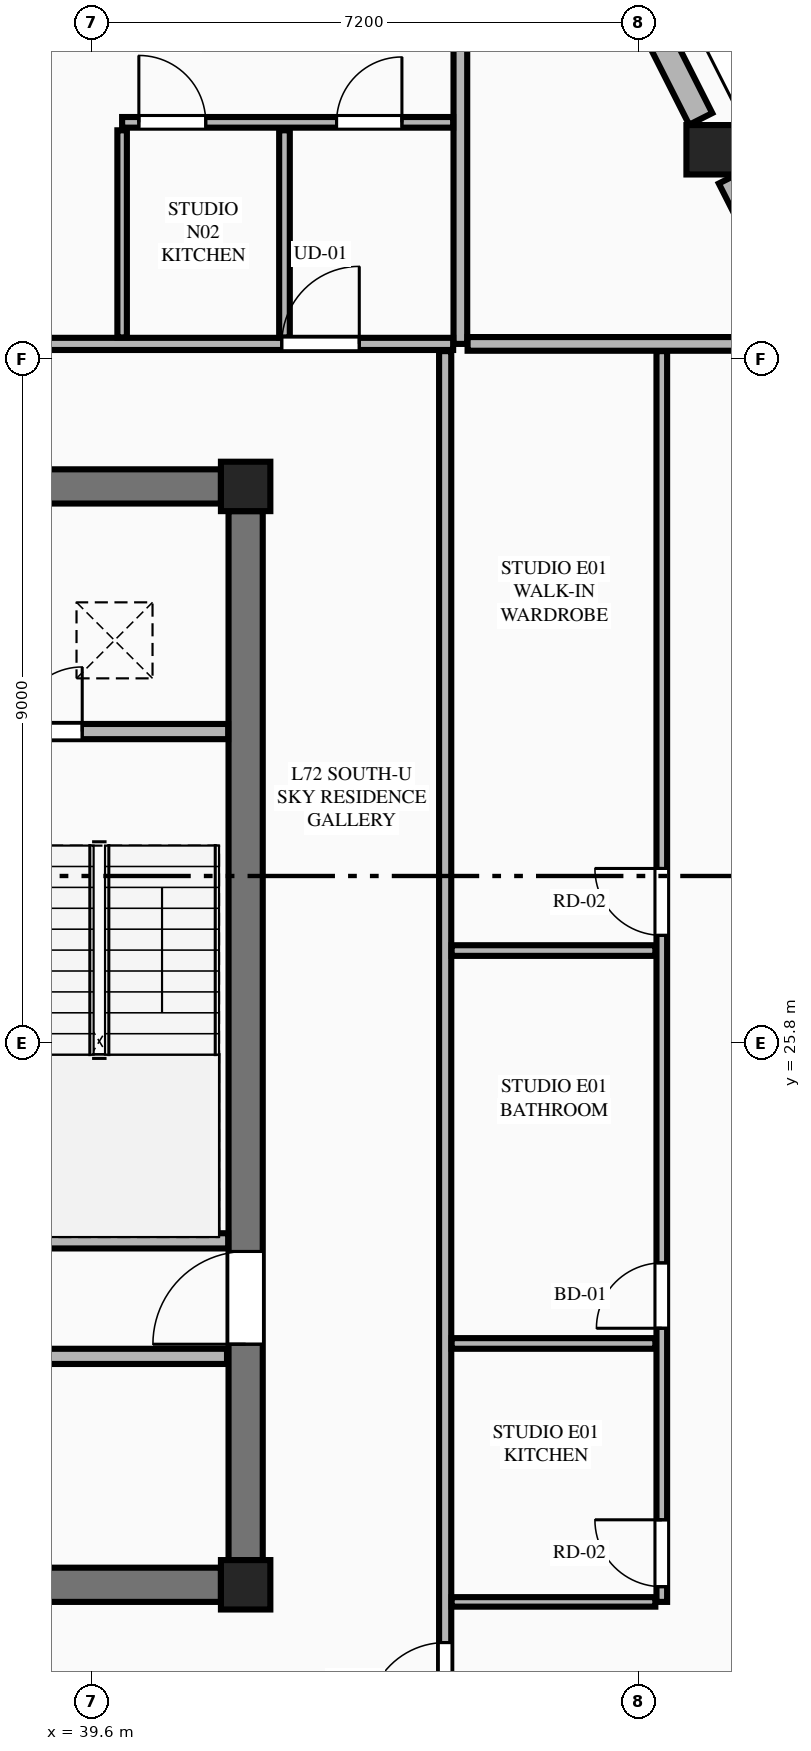
"""IFC4 building model, lengths in metres.
Left out: names, types, materials, properties, quantities, classifications, styles, units other than length and angle.
Written with IfcOpenShell. Run it as: python <this file> out.ifc"""

import sys

from ifc_helpers import new_model, si_unit, direction, frame, frame_2d, origin, origin_2d, place, context, subcontext, project, spatial, rectangle, extrude, element, fill, save


model = new_model("IFC4")
c1 = context("Model", 3, precision=1e-05, world=origin(), true_north=direction((0.0, 1.0)))
c2 = subcontext(c1, "Body", "Model", "MODEL_VIEW")
j1 = project(units=[si_unit("LENGTHUNIT", "METRE"), si_unit("PLANEANGLEUNIT", "RADIAN")], contexts=[c1])
p1 = place(None, origin())
s1 = spatial("IfcSite", under=j1, at=p1, CompositionType="ELEMENT")
p2 = place(p1, origin())
s2 = spatial("IfcBuilding", under=s1, at=p2, CompositionType="ELEMENT")
p3 = place(p2, frame((0.0, 0.0, 270.8)))
s3 = spatial("IfcBuildingStorey", under=s2, at=p3, CompositionType="ELEMENT", Elevation=270.8)
for number, where, z_axis, x_axis in (
    (1, (41.625, 18.675, 0.0), (0.0, 0.0, 1.0), (1.0, 0.0, 0.0)),
    (2, (41.625, 33.125, 0.0), (0.0, 0.0, 1.0), (1.0, 0.0, 0.0)),
):
    element("IfcColumn", number, at=place(p3, frame(where, z_axis=z_axis, x_axis=x_axis)), inside=s3, PredefinedType="COLUMN", context=c2, shape_type="SweptSolid", body=[
        extrude(rectangle(XDim=0.65, YDim=0.65, at=origin_2d()), origin(), (0.0, 0.0, 1.0), 3.65),
    ])
for number, where, z_axis, x_axis in (
    (3, (23.5, 18.675, 0.0), (0.0, 0.0, 1.0), (1.0, 0.0, 0.0)),
    (4, (23.5, 33.125, 0.0), (0.0, 0.0, 1.0), (1.0, 0.0, 0.0)),
):
    element("IfcWall", number, at=place(p3, frame(where, z_axis=z_axis, x_axis=x_axis)), inside=s3, PredefinedType="SHEAR", context=c2, shape_type="SweptSolid", body=[
        extrude(rectangle(XDim=17.8, YDim=0.45, at=frame_2d((8.9, 0.0))), origin(), (0.0, 0.0, 1.0), 3.45),
    ])
p4 = place(p3, frame((41.625, 19.0, 0.0), z_axis=(0.0, 0.0, 1.0), x_axis=(0.0, 1.0, 0.0)))
e5 = element("IfcWall", 5, at=p4, inside=s3, PredefinedType="SHEAR", context=c2, shape_type="SweptSolid", body=[
    extrude(rectangle(XDim=13.8, YDim=0.45, at=frame_2d((6.9, 0.0))), origin(), (0.0, 0.0, 1.0), 3.45),
])
p5 = place(p4, frame((2.84, 0.0, 0.0)))
e6 = element("IfcOpeningElement", 6, at=p5, cuts=e5, PredefinedType="OPENING", context=c2, shape_type="SweptSolid", body=[
    extrude(rectangle(XDim=1.22, YDim=2.25, at=frame_2d((0.61, 1.125))), frame((0.0, 0.235, 0.0), z_axis=(0.0, -1.0, 0.0), x_axis=(1.0, 0.0, 0.0)), (0.0, 0.0, 1.0), 0.47),
])
p6 = place(p3, frame((47.749, 37.554, 0.0), z_axis=(0.0, 0.0, 1.0), x_axis=(1.0, 0.0, 0.0)))
e7 = element("IfcColumn", 7, at=p6, inside=s3, PredefinedType="COLUMN", context=c2, shape_type="SweptSolid", body=[
    extrude(rectangle(XDim=0.65, YDim=0.65, at=origin_2d()), origin(), (0.0, 0.0, 1.0), 3.65),
])
p7 = place(p3, frame((38.125, 23.2, 0.0), z_axis=(0.0, 0.0, 1.0), x_axis=(1.0, 0.0, 0.0)))
e8 = element("IfcWall", 8, at=p7, inside=s3, PredefinedType="PLUMBINGWALL", context=c2, shape_type="SweptSolid", body=[
    extrude(rectangle(XDim=3.27, YDim=0.2, at=frame_2d((1.635, 0.0))), origin(), (0.0, 0.0, 1.0), 3.45),
])
p8 = place(p3, frame((38.125, 29.9, 0.0), z_axis=(0.0, 0.0, 1.0), x_axis=(1.0, 0.0, 0.0)))
e9 = element("IfcWall", 9, at=p8, inside=s3, PredefinedType="PLUMBINGWALL", context=c2, shape_type="SweptSolid", body=[
    extrude(rectangle(XDim=3.27, YDim=0.2, at=frame_2d((1.635, 0.0))), origin(), (0.0, 0.0, 1.0), 3.45),
])
p9 = place(p8, frame((0.5, 0.0, 0.0)))
e10 = element("IfcOpeningElement", 10, at=p9, cuts=e9, PredefinedType="OPENING", context=c2, shape_type="SweptSolid", body=[
    extrude(rectangle(XDim=0.85, YDim=2.05, at=frame_2d((0.425, 1.025))), frame((0.0, 0.11, 0.0), z_axis=(0.0, -1.0, 0.0), x_axis=(1.0, 0.0, 0.0)), (0.0, 0.0, 1.0), 0.22),
])
p10 = place(p3, frame((23.42, 21.68, 0.0), z_axis=(0.0, 0.0, 1.0), x_axis=(1.0, 0.0, 0.0)))
e11 = element("IfcWall", 11, at=p10, inside=s3, PredefinedType="PLUMBINGWALL", context=c2, shape_type="SweptSolid", body=[
    extrude(rectangle(XDim=17.96, YDim=0.2, at=frame_2d((8.98, 0.0))), origin(), (0.0, 0.0, 1.0), 3.45),
])
p11 = place(p10, frame((0.46, 0.0, 0.0)))
e12 = element("IfcOpeningElement", 12, at=p11, cuts=e11, PredefinedType="OPENING", context=c2, shape_type="SweptSolid", body=[
    extrude(rectangle(XDim=0.92, YDim=2.15, at=frame_2d((0.46, 1.075))), frame((0.0, 0.11, 0.0), z_axis=(0.0, -1.0, 0.0), x_axis=(1.0, 0.0, 0.0)), (0.0, 0.0, 1.0), 0.22),
])
p12 = place(p10, frame((9.48, 0.0, 0.0)))
e13 = element("IfcOpeningElement", 13, at=p12, cuts=e11, PredefinedType="OPENING", context=c2, shape_type="SweptSolid", body=[
    extrude(rectangle(XDim=0.92, YDim=2.15, at=frame_2d((0.46, 1.075))), frame((0.0, 0.11, 0.0), z_axis=(0.0, -1.0, 0.0), x_axis=(1.0, 0.0, 0.0)), (0.0, 0.0, 1.0), 0.22),
])
p13 = place(p3, frame((48.002, 14.413, 0.0), z_axis=(0.0, 0.0, 1.0), x_axis=(0.451468341582, 0.892287137949, 0.0)))
e14 = element("IfcWall", 14, at=p13, inside=s3, PredefinedType="STANDARD", context=c2, shape_type="SweptSolid", body=[
    extrude(rectangle(XDim=4.723, YDim=0.34, at=frame_2d((2.361, 0.0))), origin(), (0.0, 0.0, 1.0), 2.983),
])
p14 = place(p13, frame((2.941, 0.0, 0.0)))
e15 = element("IfcOpeningElement", 15, at=p14, cuts=e14, PredefinedType="OPENING", context=c2, shape_type="SweptSolid", body=[
    extrude(rectangle(XDim=1.1, YDim=2.25, at=frame_2d((0.55, 1.125))), frame((0.0, 0.18, 0.0), z_axis=(0.0, -1.0, 0.0), x_axis=(1.0, 0.0, 0.0)), (0.0, 0.0, 1.0), 0.36),
])
p15 = place(p13, frame((0.434, 0.0, 0.75)))
e16 = element("IfcOpeningElement", 16, at=p15, cuts=e14, PredefinedType="OPENING", context=c2, shape_type="SweptSolid", body=[
    extrude(rectangle(XDim=1.1, YDim=2.0, at=frame_2d((0.55, 1.0))), frame((0.0, 0.18, 0.0), z_axis=(0.0, -1.0, 0.0), x_axis=(1.0, 0.0, 0.0)), (0.0, 0.0, 1.0), 0.36),
])
p16 = place(p3, frame((50.134, 32.973, 0.0), z_axis=(0.0, 0.0, 1.0), x_axis=(-0.451447516904, 0.892297674255, 0.0)))
e17 = element("IfcWall", 17, at=p16, inside=s3, PredefinedType="STANDARD", context=c2, shape_type="SweptSolid", body=[
    extrude(rectangle(XDim=4.723, YDim=0.34, at=frame_2d((2.361, 0.0))), origin(), (0.0, 0.0, 1.0), 2.983),
])
p17 = place(p16, frame((0.34, 0.0, 0.75)))
e18 = element("IfcOpeningElement", 18, at=p17, cuts=e17, PredefinedType="OPENING", context=c2, shape_type="SweptSolid", body=[
    extrude(rectangle(XDim=1.55, YDim=2.05, at=frame_2d((0.775, 1.025))), frame((0.0, 0.18, 0.0), z_axis=(0.0, -1.0, 0.0), x_axis=(1.0, 0.0, 0.0)), (0.0, 0.0, 1.0), 0.36),
])
p18 = place(p16, frame((3.077, 0.0, 0.75)))
e19 = element("IfcOpeningElement", 19, at=p18, cuts=e17, PredefinedType="OPENING", context=c2, shape_type="SweptSolid", body=[
    extrude(rectangle(XDim=1.1, YDim=2.0, at=frame_2d((0.55, 1.0))), frame((0.0, 0.18, 0.0), z_axis=(0.0, -1.0, 0.0), x_axis=(1.0, 0.0, 0.0)), (0.0, 0.0, 1.0), 0.36),
])
p19 = place(p3, frame((47.612, 37.96, 0.0), z_axis=(0.0, 0.0, 1.0), x_axis=(-0.45154039276, 0.892250678737, 0.0)))
e20 = element("IfcWall", 20, at=p19, inside=s3, PredefinedType="STANDARD", context=c2, shape_type="SweptSolid", body=[
    extrude(rectangle(XDim=4.554, YDim=0.34, at=frame_2d((2.277, 0.0))), origin(), (0.0, 0.0, 1.0), 2.983),
])
p20 = place(p19, frame((1.577, 0.0, 0.75)))
e21 = element("IfcOpeningElement", 21, at=p20, cuts=e20, PredefinedType="OPENING", context=c2, shape_type="SweptSolid", body=[
    extrude(rectangle(XDim=1.4, YDim=2.05, at=frame_2d((0.7, 1.025))), frame((0.0, 0.18, 0.0), z_axis=(0.0, -1.0, 0.0), x_axis=(1.0, 0.0, 0.0)), (0.0, 0.0, 1.0), 0.36),
])
p21 = place(p3, frame((44.45, 35.0, 0.0), z_axis=(0.0, 0.0, 1.0), x_axis=(0.0, 1.0, 0.0)))
e22 = element("IfcWall", 22, at=p21, inside=s3, PredefinedType="PARTITIONING", context=c2, shape_type="SweptSolid", body=[
    extrude(rectangle(XDim=8.481, YDim=0.18, at=frame_2d((4.24, 0.0))), origin(), (0.0, 0.0, 1.0), 3.45),
])
p22 = place(p3, frame((35.749, 35.0, 0.0), z_axis=(0.0, 0.0, 1.0), x_axis=(1.0, 0.0, 0.0)))
e23 = element("IfcWall", 23, at=p22, inside=s3, PredefinedType="PARTITIONING", context=c2, shape_type="SweptSolid", body=[
    extrude(rectangle(XDim=8.606, YDim=0.16, at=frame_2d((4.303, 0.0))), origin(), (0.0, 0.0, 1.0), 3.45),
])
p23 = place(p22, frame((6.351, 0.0, 0.0)))
e24 = element("IfcOpeningElement", 24, at=p23, cuts=e23, PredefinedType="OPENING", context=c2, shape_type="SweptSolid", body=[
    extrude(rectangle(XDim=1.02, YDim=2.25, at=frame_2d((0.51, 1.125))), frame((0.0, 0.09, 0.0), z_axis=(0.0, -1.0, 0.0), x_axis=(1.0, 0.0, 0.0)), (0.0, 0.0, 1.0), 0.18),
])
p24 = place(p3, frame((40.0, 35.085, 0.0), z_axis=(0.0, 0.0, 1.0), x_axis=(0.0, 1.0, 0.0)))
e25 = element("IfcWall", 25, at=p24, inside=s3, PredefinedType="PARTITIONING", context=c2, shape_type="SweptSolid", body=[
    extrude(rectangle(XDim=2.725, YDim=0.125, at=frame_2d((1.363, 0.0))), origin(), (0.0, 0.0, 1.0), 3.45),
])
p25 = place(p3, frame((40.0, 37.915, 0.0), z_axis=(0.0, 0.0, 1.0), x_axis=(1.0, 0.0, 0.0)))
e26 = element("IfcWall", 26, at=p25, inside=s3, PredefinedType="PLUMBINGWALL", context=c2, shape_type="SweptSolid", body=[
    extrude(rectangle(XDim=4.355, YDim=0.14, at=frame_2d((2.177, 0.0))), origin(), (0.0, 0.0, 1.0), 3.45),
])
p26 = place(p25, frame((2.821, 0.0, 0.0)))
e27 = element("IfcOpeningElement", 27, at=p26, cuts=e26, PredefinedType="OPENING", context=c2, shape_type="SweptSolid", body=[
    extrude(rectangle(XDim=0.86, YDim=2.1, at=frame_2d((0.43, 1.05))), frame((0.0, 0.08, 0.0), z_axis=(0.0, -1.0, 0.0), x_axis=(1.0, 0.0, 0.0)), (0.0, 0.0, 1.0), 0.16),
])
p27 = place(p25, frame((0.22, 0.0, 0.0)))
e28 = element("IfcOpeningElement", 28, at=p27, cuts=e26, PredefinedType="OPENING", context=c2, shape_type="SweptSolid", body=[
    extrude(rectangle(XDim=0.88, YDim=2.15, at=frame_2d((0.44, 1.075))), frame((0.0, 0.08, 0.0), z_axis=(0.0, -1.0, 0.0), x_axis=(1.0, 0.0, 0.0)), (0.0, 0.0, 1.0), 0.16),
])
p28 = place(p3, frame((42.136, 35.085, 0.0), z_axis=(0.0, 0.0, 1.0), x_axis=(0.0, 1.0, 0.0)))
e29 = element("IfcWall", 29, at=p28, inside=s3, PredefinedType="PLUMBINGWALL", context=c2, shape_type="SweptSolid", body=[
    extrude(rectangle(XDim=2.725, YDim=0.14, at=frame_2d((1.363, 0.0))), origin(), (0.0, 0.0, 1.0), 3.45),
])
p29 = place(p3, frame((44.545, 35.0, 0.0), z_axis=(0.0, 0.0, 1.0), x_axis=(1.0, 0.0, 0.0)))
e30 = element("IfcWall", 30, at=p29, inside=s3, PredefinedType="PARTITIONING", context=c2, shape_type="SweptSolid", body=[
    extrude(rectangle(XDim=4.322, YDim=0.18, at=frame_2d((2.161, 0.0))), origin(), (0.0, 0.0, 1.0), 3.45),
])
p30 = place(p3, frame((44.25, 16.495, 0.0), z_axis=(0.0, 0.0, 1.0), x_axis=(0.0, 1.0, 0.0)))
e31 = element("IfcWall", 31, at=p30, inside=s3, PredefinedType="PARTITIONING", context=c2, shape_type="SweptSolid", body=[
    extrude(rectangle(XDim=18.41, YDim=0.16, at=frame_2d((9.205, 0.0))), origin(), (0.0, 0.0, 1.0), 3.137),
])
p31 = place(p30, frame((0.4, 0.0, 0.0)))
e32 = element("IfcOpeningElement", 32, at=p31, cuts=e31, PredefinedType="OPENING", context=c2, shape_type="SweptSolid", body=[
    extrude(rectangle(XDim=1.02, YDim=2.25, at=frame_2d((0.51, 1.125))), frame((0.0, 0.09, 0.0), z_axis=(0.0, -1.0, 0.0), x_axis=(1.0, 0.0, 0.0)), (0.0, 0.0, 1.0), 0.18),
])
p32 = place(p3, frame((44.335, 18.45, 0.0), z_axis=(0.0, 0.0, 1.0), x_axis=(1.0, 0.0, 0.0)))
e33 = element("IfcWall", 33, at=p32, inside=s3, PredefinedType="PARTITIONING", context=c2, shape_type="SweptSolid", body=[
    extrude(rectangle(XDim=2.68, YDim=0.125, at=frame_2d((1.34, 0.0))), origin(), (0.0, 0.0, 1.0), 3.45),
])
p33 = place(p3, frame((47.1, 18.45, 0.0), z_axis=(0.0, 0.0, 1.0), x_axis=(0.0, 1.0, 0.0)))
e34 = element("IfcWall", 34, at=p33, inside=s3, PredefinedType="PLUMBINGWALL", context=c2, shape_type="SweptSolid", body=[
    extrude(rectangle(XDim=16.455, YDim=0.14, at=frame_2d((8.228, 0.0))), origin(), (0.0, 0.0, 1.0), 3.45),
])
p34 = place(p33, frame((3.6, 0.0, 0.0)))
e35 = element("IfcOpeningElement", 35, at=p34, cuts=e34, PredefinedType="OPENING", context=c2, shape_type="SweptSolid", body=[
    extrude(rectangle(XDim=0.86, YDim=2.1, at=frame_2d((0.43, 1.05))), frame((0.0, 0.08, 0.0), z_axis=(0.0, -1.0, 0.0), x_axis=(1.0, 0.0, 0.0)), (0.0, 0.0, 1.0), 0.16),
])
p35 = place(p33, frame((8.769, 0.0, 0.0)))
e36 = element("IfcOpeningElement", 36, at=p35, cuts=e34, PredefinedType="OPENING", context=c2, shape_type="SweptSolid", body=[
    extrude(rectangle(XDim=0.88, YDim=2.15, at=frame_2d((0.44, 1.075))), frame((0.0, 0.08, 0.0), z_axis=(0.0, -1.0, 0.0), x_axis=(1.0, 0.0, 0.0)), (0.0, 0.0, 1.0), 0.16),
])
p36 = place(p33, frame((0.2, 0.0, 0.0)))
e37 = element("IfcOpeningElement", 37, at=p36, cuts=e34, PredefinedType="OPENING", context=c2, shape_type="SweptSolid", body=[
    extrude(rectangle(XDim=0.88, YDim=2.15, at=frame_2d((0.44, 1.075))), frame((0.0, 0.08, 0.0), z_axis=(0.0, -1.0, 0.0), x_axis=(1.0, 0.0, 0.0)), (0.0, 0.0, 1.0), 0.16),
])
for number, where, z_axis, x_axis in (
    (38, (44.335, 21.85, 0.0), (0.0, 0.0, 1.0), (1.0, 0.0, 0.0)),
    (39, (44.335, 27.019, 0.0), (0.0, 0.0, 1.0), (1.0, 0.0, 0.0)),
):
    element("IfcWall", number, at=place(p3, frame(where, z_axis=z_axis, x_axis=x_axis)), inside=s3, PredefinedType="PLUMBINGWALL", context=c2, shape_type="SweptSolid", body=[
        extrude(rectangle(XDim=2.68, YDim=0.14, at=frame_2d((1.34, 0.0))), origin(), (0.0, 0.0, 1.0), 3.45),
    ])
p37 = place(p5, origin())
e40 = element("IfcDoor", 40, at=p37, inside=s3, OperationType="SINGLE_SWING_LEFT", PredefinedType="DOOR", context=c2, shape_type="SweptSolid", body=[
    extrude(rectangle(XDim=1.22, YDim=2.25, at=frame_2d((0.61, 1.125))), frame((0.0, 0.025, 0.0), z_axis=(0.0, -1.0, 0.0), x_axis=(1.0, 0.0, 0.0)), (0.0, 0.0, 1.0), 0.05),
])
fill(e6, e40)
p38 = place(p9, origin())
e41 = element("IfcDoor", 41, at=p38, inside=s3, OperationType="SINGLE_SWING_RIGHT", PredefinedType="DOOR", context=c2, shape_type="SweptSolid", body=[
    extrude(rectangle(XDim=0.85, YDim=2.05, at=frame_2d((0.425, 1.025))), frame((0.0, 0.025, 0.0), z_axis=(0.0, -1.0, 0.0), x_axis=(1.0, 0.0, 0.0)), (0.0, 0.0, 1.0), 0.05),
])
fill(e10, e41)
p39 = place(p26, origin())
e42 = element("IfcDoor", 42, at=p39, inside=s3, OperationType="SINGLE_SWING_RIGHT", PredefinedType="DOOR", context=c2, shape_type="SweptSolid", body=[
    extrude(rectangle(XDim=0.86, YDim=2.1, at=frame_2d((0.43, 1.05))), frame((0.0, 0.025, 0.0), z_axis=(0.0, -1.0, 0.0), x_axis=(1.0, 0.0, 0.0)), (0.0, 0.0, 1.0), 0.05),
])
fill(e27, e42)
p40 = place(p23, origin())
e43 = element("IfcDoor", 43, at=p40, inside=s3, OperationType="SINGLE_SWING_RIGHT", PredefinedType="DOOR", context=c2, shape_type="SweptSolid", body=[
    extrude(rectangle(XDim=1.02, YDim=2.25, at=frame_2d((0.51, 1.125))), frame((0.0, 0.025, 0.0), z_axis=(0.0, -1.0, 0.0), x_axis=(1.0, 0.0, 0.0)), (0.0, 0.0, 1.0), 0.05),
])
fill(e24, e43)
p41 = place(p27, origin())
e44 = element("IfcDoor", 44, at=p41, inside=s3, OperationType="SINGLE_SWING_LEFT", PredefinedType="DOOR", context=c2, shape_type="SweptSolid", body=[
    extrude(rectangle(XDim=0.88, YDim=2.15, at=frame_2d((0.44, 1.075))), frame((0.0, 0.025, 0.0), z_axis=(0.0, -1.0, 0.0), x_axis=(1.0, 0.0, 0.0)), (0.0, 0.0, 1.0), 0.05),
])
fill(e28, e44)
p42 = place(p34, origin())
e45 = element("IfcDoor", 45, at=p42, inside=s3, OperationType="SINGLE_SWING_LEFT", PredefinedType="DOOR", context=c2, shape_type="SweptSolid", body=[
    extrude(rectangle(XDim=0.86, YDim=2.1, at=frame_2d((0.43, 1.05))), frame((0.0, 0.025, 0.0), z_axis=(0.0, -1.0, 0.0), x_axis=(1.0, 0.0, 0.0)), (0.0, 0.0, 1.0), 0.05),
])
fill(e35, e45)
p43 = place(p35, origin())
e46 = element("IfcDoor", 46, at=p43, inside=s3, OperationType="SINGLE_SWING_RIGHT", PredefinedType="DOOR", context=c2, shape_type="SweptSolid", body=[
    extrude(rectangle(XDim=0.88, YDim=2.15, at=frame_2d((0.44, 1.075))), frame((0.0, 0.025, 0.0), z_axis=(0.0, -1.0, 0.0), x_axis=(1.0, 0.0, 0.0)), (0.0, 0.0, 1.0), 0.05),
])
fill(e36, e46)
p44 = place(p31, origin())
e47 = element("IfcDoor", 47, at=p44, inside=s3, OperationType="SINGLE_SWING_LEFT", PredefinedType="DOOR", context=c2, shape_type="SweptSolid", body=[
    extrude(rectangle(XDim=1.02, YDim=2.25, at=frame_2d((0.51, 1.125))), frame((0.0, 0.025, 0.0), z_axis=(0.0, -1.0, 0.0), x_axis=(1.0, 0.0, 0.0)), (0.0, 0.0, 1.0), 0.05),
])
fill(e32, e47)
p45 = place(p36, origin())
e48 = element("IfcDoor", 48, at=p45, inside=s3, OperationType="SINGLE_SWING_RIGHT", PredefinedType="DOOR", context=c2, shape_type="SweptSolid", body=[
    extrude(rectangle(XDim=0.88, YDim=2.15, at=frame_2d((0.44, 1.075))), frame((0.0, 0.025, 0.0), z_axis=(0.0, -1.0, 0.0), x_axis=(1.0, 0.0, 0.0)), (0.0, 0.0, 1.0), 0.05),
])
fill(e37, e48)
save(model, sys.argv[1])
